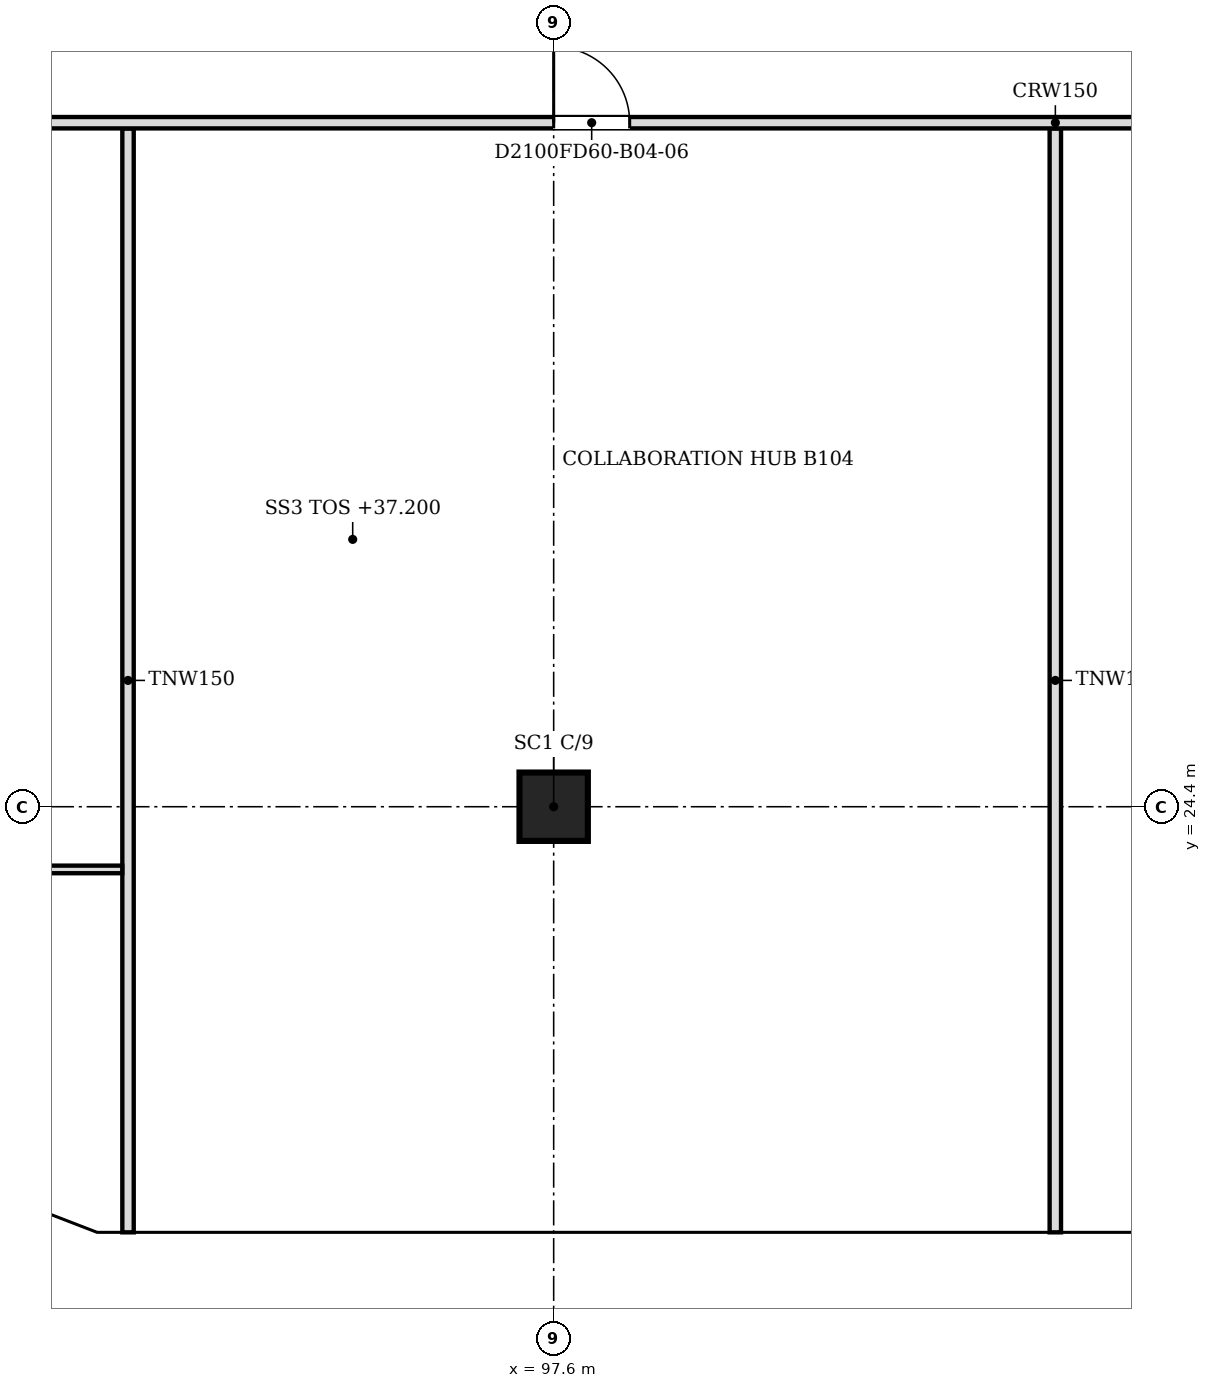
"""IFC4 building model, lengths in metres.
Left out: names, types, materials, properties, quantities, classifications, styles, units other than length and angle.
Written with IfcOpenShell. Run it as: python <this file> out.ifc"""

import sys

from ifc_helpers import new_model, si_unit, direction, frame, frame_2d, origin, origin_2d, place, context, subcontext, project, spatial, polyline, rectangle, outline, extrude, faceted_brep, source, transform, mapped, element, fill, save


model = new_model("IFC4")
c1 = context("Model", 3, precision=1e-05, world=origin(), true_north=direction((0.0, 1.0)))
c2 = subcontext(c1, "Body", "Model", "MODEL_VIEW")
j1 = project(units=[si_unit("LENGTHUNIT", "METRE"), si_unit("PLANEANGLEUNIT", "RADIAN")], contexts=[c1])
p1 = place(None, origin())
s1 = spatial("IfcSite", under=j1, at=p1, CompositionType="ELEMENT")
p2 = place(p1, origin())
s2 = spatial("IfcBuilding", under=s1, at=p2, CompositionType="ELEMENT")
p3 = place(p2, frame((0.0, 0.0, 37.2)))
s3 = spatial("IfcBuildingStorey", under=s2, at=p3, CompositionType="ELEMENT", Elevation=37.2)
p4 = place(p3, frame((97.6, 24.4, 0.0), z_axis=(0.0, 0.0, 1.0), x_axis=(1.0, 0.0, 0.0)))
e1 = element("IfcColumn", 1, at=p4, inside=s3, PredefinedType="COLUMN", context=c2, shape_type="SweptSolid", body=[
    extrude(rectangle(XDim=0.9, YDim=0.9, at=origin_2d()), origin(), (0.0, 0.0, 1.0), 3.6),
])
m1 = source(origin(), c2, "Body", "Brep", [
    faceted_brep([(3.003, -0.25, 0.0), (6.053, -0.25, 3.8), (3.003, -0.25, 7.6), (0.0, -0.25, 3.8), (0.047, 0.25, 3.859), (3.003, 0.25, 7.6), (6.053, 0.25, 3.8), (3.003, 0.25, 0.0), (0.047, 0.25, 3.741), (0.0, 0.0, 3.8)], [[[0, 1, 2, 3]], [[4, 5, 6, 7, 8]], [[7, 6, 1, 0]], [[6, 5, 2, 1]], [[5, 4, 9, 3, 2]], [[8, 7, 0, 3, 9]], [[8, 9, 4]]]),
])
p5 = place(p3, frame((91.547, 18.55, -3.8), z_axis=(0.0, 0.0, 1.0), x_axis=(1.0, 0.0, 0.0)))
e2 = element("IfcWall", 2, at=p5, inside=s3, PredefinedType="SOLIDWALL", context=c2, shape_type="MappedRepresentation", body=[
    mapped(m1, transform((0.0, 0.0, 0.0), scale=1.0)),
])
m2 = source(origin(), c2, "Body", "SweptSolid", [
    extrude(outline(polyline([(3.005, 0.401), (5.733, 3.8), (3.005, 7.199), (0.319, 3.8), (3.005, 0.401)])), frame((0.0, 0.26, 0.0), z_axis=(0.0, -1.0, 0.0), x_axis=(1.0, 0.0, 0.0)), (0.0, 0.0, 1.0), 0.52),
])
p6 = place(p5, origin())
e3 = element("IfcOpeningElement", 3, at=p6, cuts=e2, PredefinedType="OPENING", context=c2, shape_type="MappedRepresentation", body=[
    mapped(m2, transform((0.0, 0.0, 0.0), scale=1.0)),
])
m3 = source(origin(), c2, "Body", "Brep", [
    faceted_brep([(3.05, -0.25, 0.0), (6.1, -0.25, 3.8), (6.1, -0.25, 3.8), (3.05, -0.25, 7.6), (0.0, -0.25, 3.8), (0.0, 0.25, 3.8), (3.05, 0.25, 7.6), (6.1, 0.25, 3.8), (6.1, 0.25, 3.8), (3.05, 0.25, 0.0)], [[[0, 1, 2, 3, 4]], [[5, 6, 7, 8, 9]], [[9, 8, 1, 0]], [[7, 6, 3, 2]], [[6, 5, 4, 3]], [[5, 9, 0, 4]], [[1, 8, 7, 2]]]),
])
p7 = place(p3, frame((97.6, 18.55, -3.8), z_axis=(0.0, 0.0, 1.0), x_axis=(1.0, 0.0, 0.0)))
e4 = element("IfcWall", 4, at=p7, inside=s3, PredefinedType="SOLIDWALL", context=c2, shape_type="MappedRepresentation", body=[
    mapped(m3, transform((0.0, 0.0, 0.0), scale=1.0)),
])
m4 = source(origin(), c2, "Body", "SweptSolid", [
    extrude(outline(polyline([(3.05, 0.399), (5.78, 3.8), (3.05, 7.201), (0.321, 3.8), (3.05, 0.399)])), frame((0.0, 0.26, 0.0), z_axis=(0.0, -1.0, 0.0), x_axis=(1.0, 0.0, 0.0)), (0.0, 0.0, 1.0), 0.52),
])
p8 = place(p7, origin())
e5 = element("IfcOpeningElement", 5, at=p8, cuts=e4, PredefinedType="OPENING", context=c2, shape_type="MappedRepresentation", body=[
    mapped(m4, transform((0.0, 0.0, 0.0), scale=1.0)),
])
m5 = source(origin(), c2, "Body", "SweptSolid", [
    extrude(outline(polyline([(3.05, 0.0), (6.1, 3.8), (3.05, 7.6), (0.0, 3.8), (3.05, 0.0)])), frame((0.0, 0.25, 0.0), z_axis=(0.0, -1.0, 0.0), x_axis=(1.0, 0.0, 0.0)), (0.0, 0.0, 1.0), 0.5),
])
p9 = place(p3, frame((103.7, 18.55, -3.8), z_axis=(0.0, 0.0, 1.0), x_axis=(1.0, 0.0, 0.0)))
e6 = element("IfcWall", 6, at=p9, inside=s3, PredefinedType="SOLIDWALL", context=c2, shape_type="MappedRepresentation", body=[
    mapped(m5, transform((0.0, 0.0, 0.0), scale=1.0)),
])
p10 = place(p9, origin())
e7 = element("IfcOpeningElement", 7, at=p10, cuts=e6, PredefinedType="OPENING", context=c2, shape_type="MappedRepresentation", body=[
    mapped(m4, transform((0.0, 0.0, 0.0), scale=1.0)),
])
m6 = source(origin(), c2, "Body", "Brep", [
    faceted_brep([(0.053, -0.25, 0.0), (3.003, -0.25, 3.8), (0.053, -0.25, 7.6), (0.0, -0.25, 7.532), (0.0, -0.25, 0.068), (0.106, 0.25, 7.532), (2.957, 0.25, 3.86), (2.957, 0.25, 3.74), (0.106, 0.25, 0.068), (3.003, 0.0, 3.8), (0.053, 0.0, 0.0), (0.053, 0.0, 7.6)], [[[0, 1, 2, 3, 4]], [[5, 6, 7, 8]], [[8, 7, 9, 1, 0, 10]], [[6, 5, 11, 2, 1, 9]], [[3, 2, 11]], [[10, 0, 4]], [[8, 10, 4, 3, 11, 5]], [[9, 7, 6]]]),
])
p11 = place(p3, frame((88.744, 19.631, -3.8), z_axis=(0.0, 0.0, 1.0), x_axis=(0.932997369089, -0.359883188373, 0.0)))
e8 = element("IfcWall", 8, at=p11, inside=s3, PredefinedType="SOLIDWALL", context=c2, shape_type="MappedRepresentation", body=[
    mapped(m6, transform((0.0, 0.0, 0.0), scale=1.0)),
])
m7 = source(origin(), c2, "Body", "SweptSolid", [
    extrude(outline(polyline([(0.253, 0.665), (2.687, 3.8), (0.253, 6.935), (0.253, 0.665)])), frame((0.0, 0.26, 0.0), z_axis=(0.0, -1.0, 0.0), x_axis=(1.0, 0.0, 0.0)), (0.0, 0.0, 1.0), 0.52),
])
p12 = place(p11, origin())
e9 = element("IfcOpeningElement", 9, at=p12, cuts=e8, PredefinedType="OPENING", context=c2, shape_type="MappedRepresentation", body=[
    mapped(m7, transform((0.0, 0.0, 0.0), scale=1.0)),
])
p13 = place(p2, frame((0.0, 0.0, 41.0)))
s4 = spatial("IfcBuildingStorey", under=s2, at=p13, CompositionType="ELEMENT", Elevation=41.0)
m8 = source(origin(), c2, "Body", "Brep", [
    faceted_brep([(0.047, -0.25, 0.0), (3.05, -0.25, 3.8), (0.047, -0.25, 7.6), (0.0, -0.25, 7.54), (0.0, -0.25, 0.06), (0.093, 0.25, 7.541), (3.05, 0.25, 3.8), (0.093, 0.25, 0.059), (0.047, 0.0, 0.0), (0.047, 0.0, 7.6)], [[[0, 1, 2, 3, 4]], [[5, 6, 7]], [[7, 6, 1, 0, 8]], [[6, 5, 9, 2, 1]], [[3, 2, 9]], [[8, 0, 4]], [[7, 8, 4, 3, 9, 5]]]),
])
p14 = place(p13, frame((91.5, 18.55, -3.8), z_axis=(0.0, 0.0, 1.0), x_axis=(1.0, 0.0, 0.0)))
e10 = element("IfcWall", 10, at=p14, inside=s4, PredefinedType="SOLIDWALL", context=c2, shape_type="MappedRepresentation", body=[
    mapped(m8, transform((0.0, 0.0, 0.0), scale=1.0)),
])
m9 = source(origin(), c2, "Body", "SweptSolid", [
    extrude(outline(polyline([(0.247, 0.656), (2.731, 3.8), (0.247, 6.944), (0.247, 0.656)])), frame((0.0, 0.26, 0.0), z_axis=(0.0, -1.0, 0.0), x_axis=(1.0, 0.0, 0.0)), (0.0, 0.0, 1.0), 0.52),
])
p15 = place(p14, origin())
e11 = element("IfcOpeningElement", 11, at=p15, cuts=e10, PredefinedType="OPENING", context=c2, shape_type="MappedRepresentation", body=[
    mapped(m9, transform((0.0, 0.0, 0.0), scale=1.0)),
])
m10 = source(origin(), c2, "Body", "Brep", [
    faceted_brep([(2.95, -0.25, 0.0), (2.997, -0.25, 0.059), (2.997, -0.25, 7.541), (2.95, -0.25, 7.6), (0.0, -0.25, 3.8), (0.053, 0.25, 3.868), (2.904, 0.25, 7.54), (2.904, 0.25, 0.06), (0.053, 0.25, 3.732), (2.95, 0.0, 0.0), (2.95, 0.0, 7.6), (0.0, 0.0, 3.8)], [[[0, 1, 2, 3, 4]], [[5, 6, 7, 8]], [[1, 0, 9]], [[10, 3, 2]], [[6, 5, 11, 4, 3, 10]], [[8, 7, 9, 0, 4, 11]], [[8, 11, 5]], [[1, 9, 7, 6, 10, 2]]]),
])
p16 = place(p13, frame((88.794, 19.612, -3.8), z_axis=(0.0, 0.0, 1.0), x_axis=(0.933000876937, -0.359874094142, 0.0)))
e12 = element("IfcWall", 12, at=p16, inside=s4, PredefinedType="SOLIDWALL", context=c2, shape_type="MappedRepresentation", body=[
    mapped(m10, transform((0.0, 0.0, 0.0), scale=1.0)),
])
m11 = source(origin(), c2, "Body", "SweptSolid", [
    extrude(outline(polyline([(2.75, 6.935), (0.316, 3.8), (2.75, 0.665), (2.75, 6.935)])), frame((0.0, 0.26, 0.0), z_axis=(0.0, -1.0, 0.0), x_axis=(1.0, 0.0, 0.0)), (0.0, 0.0, 1.0), 0.52),
])
p17 = place(p16, origin())
e13 = element("IfcOpeningElement", 13, at=p17, cuts=e12, PredefinedType="OPENING", context=c2, shape_type="MappedRepresentation", body=[
    mapped(m11, transform((0.0, 0.0, 0.0), scale=1.0)),
])
p18 = place(p13, frame((94.55, 18.55, -3.8), z_axis=(0.0, 0.0, 1.0), x_axis=(1.0, 0.0, 0.0)))
e14 = element("IfcWall", 14, at=p18, inside=s4, PredefinedType="SOLIDWALL", context=c2, shape_type="MappedRepresentation", body=[
    mapped(m3, transform((0.0, 0.0, 0.0), scale=1.0)),
])
p19 = place(p18, origin())
e15 = element("IfcOpeningElement", 15, at=p19, cuts=e14, PredefinedType="OPENING", context=c2, shape_type="MappedRepresentation", body=[
    mapped(m4, transform((0.0, 0.0, 0.0), scale=1.0)),
])
p20 = place(p13, frame((100.65, 18.55, -3.8), z_axis=(0.0, 0.0, 1.0), x_axis=(1.0, 0.0, 0.0)))
e16 = element("IfcWall", 16, at=p20, inside=s4, PredefinedType="SOLIDWALL", context=c2, shape_type="MappedRepresentation", body=[
    mapped(m5, transform((0.0, 0.0, 0.0), scale=1.0)),
])
p21 = place(p20, origin())
e17 = element("IfcOpeningElement", 17, at=p21, cuts=e16, PredefinedType="OPENING", context=c2, shape_type="MappedRepresentation", body=[
    mapped(m4, transform((0.0, 0.0, 0.0), scale=1.0)),
])
for number, where, z_axis, x_axis in (
    (18, (92.0, 18.8, 0.0), (0.0, 0.0, 1.0), (0.0, 1.0, 0.0)),
    (19, (104.2, 18.8, 0.0), (0.0, 0.0, 1.0), (0.0, 1.0, 0.0)),
):
    element("IfcWall", number, at=place(p3, frame(where, z_axis=z_axis, x_axis=x_axis)), inside=s3, PredefinedType="PARTITIONING", context=c2, shape_type="SweptSolid", body=[
        extrude(rectangle(XDim=14.524, YDim=0.15, at=frame_2d((7.262, 0.0))), origin(), (0.0, 0.0, 1.0), 3.067),
    ])
p22 = place(p3, frame((91.924, 23.575, 0.0), z_axis=(0.0, 0.0, 1.0), x_axis=(-1.0, 0.0, 0.0)))
e20 = element("IfcWall", 20, at=p22, inside=s3, PredefinedType="PARTITIONING", context=c2, shape_type="SweptSolid", body=[
    extrude(rectangle(XDim=5.67, YDim=0.1, at=frame_2d((2.835, 0.0))), origin(), (0.0, 0.0, 1.0), 3.067),
])
m12 = source(origin(), c2, "Body", "SweptSolid", [
    extrude(rectangle(XDim=0.9, YDim=2.1, at=frame_2d((0.45, 1.05))), frame((0.0, 0.06, 0.0), z_axis=(0.0, -1.0, 0.0), x_axis=(1.0, 0.0, 0.0)), (0.0, 0.0, 1.0), 0.12),
])
p23 = place(p22, frame((2.37, 0.0, 0.0)))
e21 = element("IfcOpeningElement", 21, at=p23, cuts=e20, PredefinedType="OPENING", context=c2, shape_type="MappedRepresentation", body=[
    mapped(m12, transform((0.0, 0.0, 0.0), scale=1.0)),
])
p24 = place(p3, frame((133.7, 33.4, 0.0), z_axis=(0.0, 0.0, 1.0), x_axis=(-1.0, 0.0, 0.0)))
e22 = element("IfcWall", 22, at=p24, inside=s3, PredefinedType="PARTITIONING", context=c2, shape_type="SweptSolid", body=[
    extrude(rectangle(XDim=47.8, YDim=0.15, at=frame_2d((23.9, 0.0))), origin(), (0.0, 0.0, 1.0), 3.067),
])
m13 = source(origin(), c2, "Body", "SweptSolid", [
    extrude(rectangle(XDim=0.9, YDim=2.1, at=frame_2d((0.45, 1.05))), frame((0.0, 0.085, 0.0), z_axis=(0.0, -1.0, 0.0), x_axis=(1.0, 0.0, 0.0)), (0.0, 0.0, 1.0), 0.17),
])
p25 = place(p24, frame((14.099, 0.0, 0.0)))
e23 = element("IfcOpeningElement", 23, at=p25, cuts=e22, PredefinedType="OPENING", context=c2, shape_type="MappedRepresentation", body=[
    mapped(m13, transform((0.0, 0.0, 0.0), scale=1.0)),
])
p26 = place(p24, frame((44.3, 0.0, 0.0)))
e24 = element("IfcOpeningElement", 24, at=p26, cuts=e22, PredefinedType="OPENING", context=c2, shape_type="MappedRepresentation", body=[
    mapped(m13, transform((0.0, 0.0, 0.0), scale=1.0)),
])
p27 = place(p24, frame((5.4, 0.0, 0.0)))
e25 = element("IfcOpeningElement", 25, at=p27, cuts=e22, PredefinedType="OPENING", context=c2, shape_type="MappedRepresentation", body=[
    mapped(m13, transform((0.0, 0.0, 0.0), scale=1.0)),
])
m14 = source(origin(), c2, "Body", "SweptSolid", [
    extrude(rectangle(XDim=1.0, YDim=2.1, at=frame_2d((0.5, 1.05))), frame((0.0, 0.085, 0.0), z_axis=(0.0, -1.0, 0.0), x_axis=(1.0, 0.0, 0.0)), (0.0, 0.0, 1.0), 0.17),
])
p28 = place(p24, frame((22.899, 0.0, 0.0)))
e26 = element("IfcOpeningElement", 26, at=p28, cuts=e22, PredefinedType="OPENING", context=c2, shape_type="MappedRepresentation", body=[
    mapped(m14, transform((0.0, 0.0, 0.0), scale=1.0)),
])
p29 = place(p24, frame((35.1, 0.0, 0.0)))
e27 = element("IfcOpeningElement", 27, at=p29, cuts=e22, PredefinedType="OPENING", context=c2, shape_type="MappedRepresentation", body=[
    mapped(m14, transform((0.0, 0.0, 0.0), scale=1.0)),
])
m15 = source(origin(), c2, "Body", "SweptSolid", [
    extrude(rectangle(XDim=1.0, YDim=2.1, at=frame_2d((0.5, 1.05))), frame((0.0, 0.025, 0.0), z_axis=(0.0, -1.0, 0.0), x_axis=(1.0, 0.0, 0.0)), (0.0, 0.0, 1.0), 0.05),
])
p30 = place(p29, origin())
e28 = element("IfcDoor", 28, at=p30, inside=s3, OperationType="SINGLE_SWING_RIGHT", PredefinedType="DOOR", context=c2, shape_type="MappedRepresentation", body=[
    mapped(m15, transform((0.0, 0.0, 0.0), scale=1.0)),
])
fill(e27, e28)
save(model, sys.argv[1])
